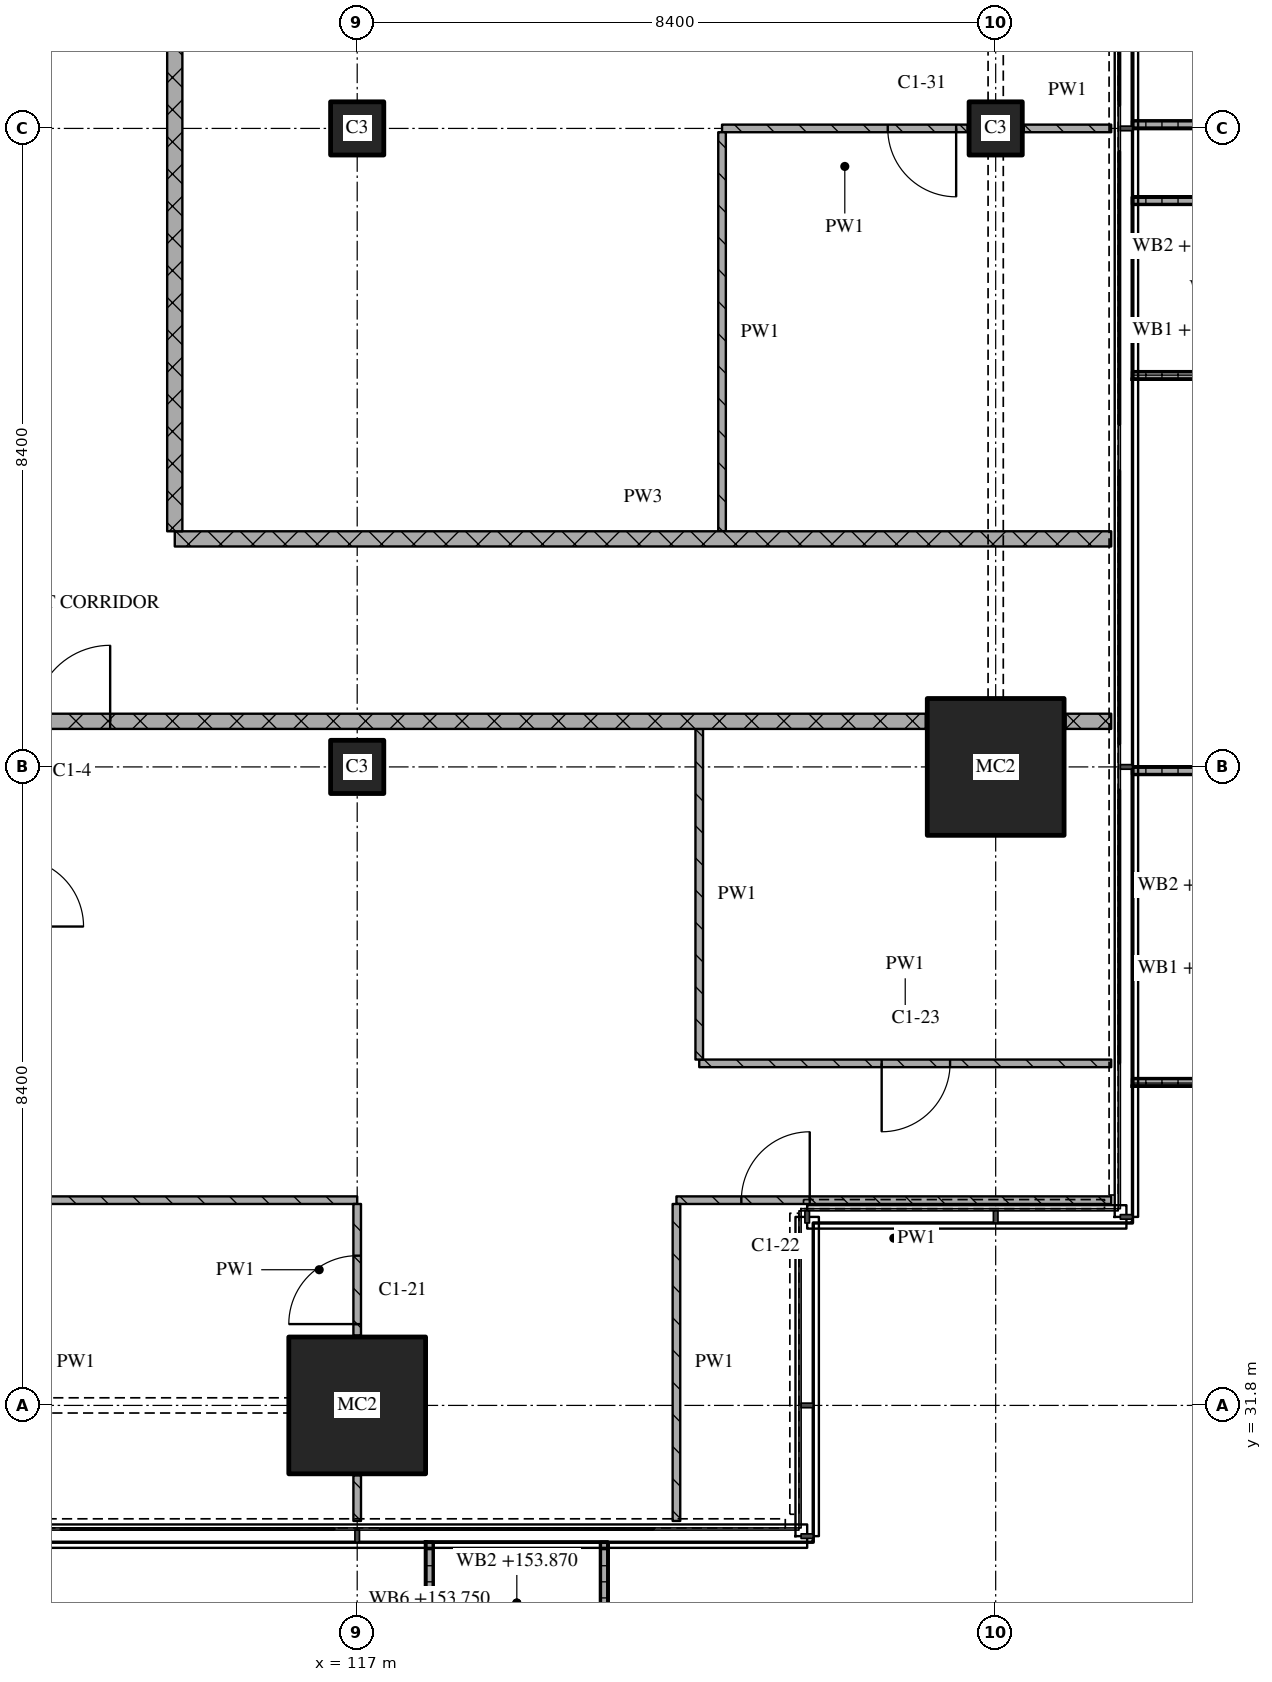
"""IFC4 building model, lengths in metres.
Left out: names, types, materials, properties, quantities, classifications, styles, units other than length and angle.
Written with IfcOpenShell. Run it as: python <this file> out.ifc"""

import sys

from ifc_helpers import new_model, si_unit, direction, frame, frame_2d, origin, origin_2d, place, context, subcontext, project, spatial, polyline, rectangle, outline, extrude, element, fill, save


model = new_model("IFC4")
c1 = context("Model", 3, precision=1e-05, world=origin(), true_north=direction((0.0, 1.0)))
c2 = subcontext(c1, "Body", "Model", "MODEL_VIEW")
j1 = project(units=[si_unit("LENGTHUNIT", "METRE"), si_unit("PLANEANGLEUNIT", "RADIAN")], contexts=[c1])
p1 = place(None, origin())
s1 = spatial("IfcSite", under=j1, at=p1, CompositionType="ELEMENT")
p2 = place(p1, origin())
s2 = spatial("IfcBuilding", under=s1, at=p2, CompositionType="ELEMENT")
p3 = place(p2, frame((0.0, 0.0, 151.05)))
s3 = spatial("IfcBuildingStorey", under=s2, at=p3, CompositionType="ELEMENT", Elevation=151.05)
p4 = place(p3, frame((117.0, 31.8, 0.0), z_axis=(0.0, 0.0, 1.0), x_axis=(1.0, 0.0, 0.0)))
e1 = element("IfcColumn", 1, at=p4, inside=s3, PredefinedType="COLUMN", context=c2, shape_type="SweptSolid", body=[
    extrude(rectangle(XDim=1.8, YDim=1.8, at=origin_2d()), origin(), (0.0, 0.0, 1.0), 3.6),
])
for number, where, z_axis, x_axis in (
    (2, (117.0, 40.2, 0.0), (0.0, 0.0, 1.0), (1.0, 0.0, 0.0)),
    (3, (117.0, 48.6, 0.0), (0.0, 0.0, 1.0), (1.0, 0.0, 0.0)),
):
    element("IfcColumn", number, at=place(p3, frame(where, z_axis=z_axis, x_axis=x_axis)), inside=s3, PredefinedType="COLUMN", context=c2, shape_type="SweptSolid", body=[
        extrude(rectangle(XDim=0.7, YDim=0.7, at=origin_2d()), origin(), (0.0, 0.0, 1.0), 3.6),
    ])
p5 = place(p3, frame((125.4, 40.2, 0.0), z_axis=(0.0, 0.0, 1.0), x_axis=(1.0, 0.0, 0.0)))
e4 = element("IfcColumn", 4, at=p5, inside=s3, PredefinedType="COLUMN", context=c2, shape_type="SweptSolid", body=[
    extrude(rectangle(XDim=1.8, YDim=1.8, at=origin_2d()), origin(), (0.0, 0.0, 1.0), 3.6),
])
p6 = place(p3, frame((125.4, 48.6, 0.0), z_axis=(0.0, 0.0, 1.0), x_axis=(1.0, 0.0, 0.0)))
e5 = element("IfcColumn", 5, at=p6, inside=s3, PredefinedType="COLUMN", context=c2, shape_type="SweptSolid", body=[
    extrude(rectangle(XDim=0.7, YDim=0.7, at=origin_2d()), origin(), (0.0, 0.0, 1.0), 3.6),
])
p7 = place(p3, origin())
e6 = element("IfcWall", 6, at=p7, inside=s3, PredefinedType="SOLIDWALL", context=c2, shape_type="SweptSolid", body=[
    extrude(outline(polyline([(117.9, 30.0), (118.0, 30.0), (118.0, 28.5), (120.2, 28.5), (120.2, 30.0), (120.3, 30.0), (120.3, 28.4), (117.9, 28.4), (117.9, 30.0)])), origin(), (0.0, 0.0, 1.0), 1.0),
])
p8 = place(p3, origin())
e7 = element("IfcWall", 7, at=p8, inside=s3, PredefinedType="SOLIDWALL", context=c2, shape_type="SweptSolid", body=[
    extrude(outline(polyline([(127.2, 36.0), (127.2, 36.1), (128.833, 36.1), (128.833, 40.1), (127.2, 40.1), (127.2, 40.2), (128.933, 40.2), (128.933, 36.0), (127.2, 36.0)])), origin(), (0.0, 0.0, 1.0), 1.0),
])
p9 = place(p3, origin())
e8 = element("IfcWall", 8, at=p9, inside=s3, PredefinedType="SOLIDWALL", context=c2, shape_type="SweptSolid", body=[
    extrude(outline(polyline([(127.2, 45.3), (127.2, 45.4), (128.7, 45.4), (128.7, 47.6), (127.2, 47.6), (127.2, 47.7), (128.8, 47.7), (128.8, 45.3), (127.2, 45.3)])), origin(), (0.0, 0.0, 1.0), 1.0),
])
p10 = place(p3, origin())
e9 = element("IfcWall", 9, at=p10, inside=s3, PredefinedType="SOLIDWALL", context=c2, shape_type="SweptSolid", body=[
    extrude(outline(polyline([(127.2, 48.6), (127.2, 48.7), (128.833, 48.7), (128.833, 52.7), (127.2, 52.7), (127.2, 52.8), (128.933, 52.8), (128.933, 48.6), (127.2, 48.6)])), origin(), (0.0, 0.0, 1.0), 1.0),
])
p11 = place(p3, frame((117.0, 34.5, 0.0), z_axis=(0.0, 0.0, 1.0), x_axis=(-1.0, 0.0, 0.0)))
e10 = element("IfcWall", 10, at=p11, inside=s3, PredefinedType="PARTITIONING", context=c2, shape_type="SweptSolid", body=[
    extrude(rectangle(XDim=16.7, YDim=0.1, at=frame_2d((8.35, 0.0))), origin(), (0.0, 0.0, 1.0), 3.32),
])
p12 = place(p11, frame((7.95, 0.0, 0.0)))
e11 = element("IfcOpeningElement", 11, at=p12, cuts=e10, PredefinedType="OPENING", context=c2, shape_type="SweptSolid", body=[
    extrude(rectangle(XDim=0.9, YDim=2.1, at=frame_2d((0.45, 1.05))), frame((0.0, 0.06, 0.0), z_axis=(0.0, -1.0, 0.0), x_axis=(1.0, 0.0, 0.0)), (0.0, 0.0, 1.0), 0.12),
])
p13 = place(p11, frame((14.25, 0.0, 0.0)))
e12 = element("IfcOpeningElement", 12, at=p13, cuts=e10, PredefinedType="OPENING", context=c2, shape_type="SweptSolid", body=[
    extrude(rectangle(XDim=0.9, YDim=2.1, at=frame_2d((0.45, 1.05))), frame((0.0, 0.06, 0.0), z_axis=(0.0, -1.0, 0.0), x_axis=(1.0, 0.0, 0.0)), (0.0, 0.0, 1.0), 0.12),
])
p14 = place(p3, frame((126.92, 34.5, 0.0), z_axis=(0.0, 0.0, 1.0), x_axis=(-1.0, 0.0, 0.0)))
e13 = element("IfcWall", 13, at=p14, inside=s3, PredefinedType="PARTITIONING", context=c2, shape_type="SweptSolid", body=[
    extrude(rectangle(XDim=5.72, YDim=0.1, at=frame_2d((2.86, 0.0))), origin(), (0.0, 0.0, 1.0), 3.32),
])
p15 = place(p14, frame((3.966, 0.0, 0.0)))
e14 = element("IfcOpeningElement", 14, at=p15, cuts=e13, PredefinedType="OPENING", context=c2, shape_type="SweptSolid", body=[
    extrude(rectangle(XDim=0.9, YDim=2.1, at=frame_2d((0.45, 1.05))), frame((0.0, 0.06, 0.0), z_axis=(0.0, -1.0, 0.0), x_axis=(1.0, 0.0, 0.0)), (0.0, 0.0, 1.0), 0.12),
])
p16 = place(p3, frame((121.5, 36.3, 0.0), z_axis=(0.0, 0.0, 1.0), x_axis=(1.0, 0.0, 0.0)))
e15 = element("IfcWall", 15, at=p16, inside=s3, PredefinedType="PARTITIONING", context=c2, shape_type="SweptSolid", body=[
    extrude(rectangle(XDim=5.42, YDim=0.1, at=frame_2d((2.71, 0.0))), origin(), (0.0, 0.0, 1.0), 3.32),
])
p17 = place(p16, frame((2.4, 0.0, 0.0)))
e16 = element("IfcOpeningElement", 16, at=p17, cuts=e15, PredefinedType="OPENING", context=c2, shape_type="SweptSolid", body=[
    extrude(rectangle(XDim=0.9, YDim=2.1, at=frame_2d((0.45, 1.05))), frame((0.0, 0.06, 0.0), z_axis=(0.0, -1.0, 0.0), x_axis=(1.0, 0.0, 0.0)), (0.0, 0.0, 1.0), 0.12),
])
p18 = place(p3, frame((124.48, 40.8, 0.0), z_axis=(0.0, 0.0, 1.0), x_axis=(-1.0, 0.0, 0.0)))
e17 = element("IfcWall", 17, at=p18, inside=s3, PredefinedType="PARTITIONING", context=c2, shape_type="SweptSolid", body=[
    extrude(rectangle(XDim=24.28, YDim=0.2, at=frame_2d((12.14, 0.0))), origin(), (0.0, 0.0, 1.0), 3.32),
])
p19 = place(p18, frame((10.73, 0.0, 0.0)))
e18 = element("IfcOpeningElement", 18, at=p19, cuts=e17, PredefinedType="OPENING", context=c2, shape_type="SweptSolid", body=[
    extrude(rectangle(XDim=1.0, YDim=2.1, at=frame_2d((0.5, 1.05))), frame((0.0, 0.11, 0.0), z_axis=(0.0, -1.0, 0.0), x_axis=(1.0, 0.0, 0.0)), (0.0, 0.0, 1.0), 0.22),
])
p20 = place(p3, frame((126.32, 40.8, 0.0), z_axis=(0.0, 0.0, 1.0), x_axis=(1.0, 0.0, 0.0)))
e19 = element("IfcWall", 19, at=p20, inside=s3, PredefinedType="PARTITIONING", context=c2, shape_type="SweptSolid", body=[
    extrude(rectangle(XDim=0.6, YDim=0.2, at=frame_2d((0.3, 0.0))), origin(), (0.0, 0.0, 1.0), 3.32),
])
p21 = place(p3, frame((114.6, 43.2, 0.0), z_axis=(0.0, 0.0, 1.0), x_axis=(1.0, 0.0, 0.0)))
e20 = element("IfcWall", 20, at=p21, inside=s3, PredefinedType="PARTITIONING", context=c2, shape_type="SweptSolid", body=[
    extrude(rectangle(XDim=12.32, YDim=0.2, at=frame_2d((6.16, 0.0))), origin(), (0.0, 0.0, 1.0), 3.32),
])
p22 = place(p3, frame((125.03, 48.6, 0.0), z_axis=(0.0, 0.0, 1.0), x_axis=(-1.0, 0.0, 0.0)))
e21 = element("IfcWall", 21, at=p22, inside=s3, PredefinedType="PARTITIONING", context=c2, shape_type="SweptSolid", body=[
    extrude(rectangle(XDim=3.23, YDim=0.1, at=frame_2d((1.615, 0.0))), origin(), (0.0, 0.0, 1.0), 3.32),
])
p23 = place(p22, frame((0.15, 0.0, 0.0)))
e22 = element("IfcOpeningElement", 22, at=p23, cuts=e21, PredefinedType="OPENING", context=c2, shape_type="SweptSolid", body=[
    extrude(rectangle(XDim=0.9, YDim=2.1, at=frame_2d((0.45, 1.05))), frame((0.0, 0.06, 0.0), z_axis=(0.0, -1.0, 0.0), x_axis=(1.0, 0.0, 0.0)), (0.0, 0.0, 1.0), 0.12),
])
p24 = place(p3, frame((125.77, 48.6, 0.0), z_axis=(0.0, 0.0, 1.0), x_axis=(1.0, 0.0, 0.0)))
e23 = element("IfcWall", 23, at=p24, inside=s3, PredefinedType="PARTITIONING", context=c2, shape_type="SweptSolid", body=[
    extrude(rectangle(XDim=1.15, YDim=0.1, at=frame_2d((0.575, 0.0))), origin(), (0.0, 0.0, 1.0), 3.32),
])
p25 = place(p3, frame((114.6, 61.1, 0.0), z_axis=(0.0, 0.0, 1.0), x_axis=(0.0, -1.0, 0.0)))
e24 = element("IfcWall", 24, at=p25, inside=s3, PredefinedType="PARTITIONING", context=c2, shape_type="SweptSolid", body=[
    extrude(rectangle(XDim=17.8, YDim=0.2, at=frame_2d((8.9, 0.0))), origin(), (0.0, 0.0, 1.0), 3.32),
])
p26 = place(p25, frame((4.65, 0.0, 0.0)))
e25 = element("IfcOpeningElement", 25, at=p26, cuts=e24, PredefinedType="OPENING", context=c2, shape_type="SweptSolid", body=[
    extrude(rectangle(XDim=1.0, YDim=2.1, at=frame_2d((0.5, 1.05))), frame((0.0, 0.11, 0.0), z_axis=(0.0, -1.0, 0.0), x_axis=(1.0, 0.0, 0.0)), (0.0, 0.0, 1.0), 0.22),
])
p27 = place(p3, frame((117.0, 30.88, 0.0), z_axis=(0.0, 0.0, 1.0), x_axis=(0.0, -1.0, 0.0)))
e26 = element("IfcWall", 26, at=p27, inside=s3, PredefinedType="PARTITIONING", context=c2, shape_type="SweptSolid", body=[
    extrude(rectangle(XDim=0.6, YDim=0.1, at=frame_2d((0.3, 0.0))), origin(), (0.0, 0.0, 1.0), 3.32),
])
p28 = place(p3, frame((117.0, 32.72, 0.0), z_axis=(0.0, 0.0, 1.0), x_axis=(0.0, 1.0, 0.0)))
e27 = element("IfcWall", 27, at=p28, inside=s3, PredefinedType="PARTITIONING", context=c2, shape_type="SweptSolid", body=[
    extrude(rectangle(XDim=1.73, YDim=0.1, at=frame_2d((0.865, 0.0))), origin(), (0.0, 0.0, 1.0), 3.32),
])
p29 = place(p28, frame((0.15, 0.0, 0.0)))
e28 = element("IfcOpeningElement", 28, at=p29, cuts=e27, PredefinedType="OPENING", context=c2, shape_type="SweptSolid", body=[
    extrude(rectangle(XDim=0.9, YDim=2.1, at=frame_2d((0.45, 1.05))), frame((0.0, 0.06, 0.0), z_axis=(0.0, -1.0, 0.0), x_axis=(1.0, 0.0, 0.0)), (0.0, 0.0, 1.0), 0.12),
])
p30 = place(p3, frame((121.2, 34.45, 0.0), z_axis=(0.0, 0.0, 1.0), x_axis=(0.0, -1.0, 0.0)))
e29 = element("IfcWall", 29, at=p30, inside=s3, PredefinedType="PARTITIONING", context=c2, shape_type="SweptSolid", body=[
    extrude(rectangle(XDim=4.17, YDim=0.1, at=frame_2d((2.085, 0.0))), origin(), (0.0, 0.0, 1.0), 3.32),
])
p31 = place(p3, frame((121.5, 40.7, 0.0), z_axis=(0.0, 0.0, 1.0), x_axis=(0.0, -1.0, 0.0)))
e30 = element("IfcWall", 30, at=p31, inside=s3, PredefinedType="PARTITIONING", context=c2, shape_type="SweptSolid", body=[
    extrude(rectangle(XDim=4.35, YDim=0.1, at=frame_2d((2.175, 0.0))), origin(), (0.0, 0.0, 1.0), 3.32),
])
p32 = place(p3, frame((121.8, 48.55, 0.0), z_axis=(0.0, 0.0, 1.0), x_axis=(0.0, -1.0, 0.0)))
e31 = element("IfcWall", 31, at=p32, inside=s3, PredefinedType="PARTITIONING", context=c2, shape_type="SweptSolid", body=[
    extrude(rectangle(XDim=5.25, YDim=0.1, at=frame_2d((2.625, 0.0))), origin(), (0.0, 0.0, 1.0), 3.32),
])
p33 = place(p15, origin())
e32 = element("IfcDoor", 32, at=p33, inside=s3, OperationType="SINGLE_SWING_RIGHT", PredefinedType="DOOR", context=c2, shape_type="SweptSolid", body=[
    extrude(rectangle(XDim=0.9, YDim=2.1, at=frame_2d((0.45, 1.05))), frame((0.0, 0.025, 0.0), z_axis=(0.0, -1.0, 0.0), x_axis=(1.0, 0.0, 0.0)), (0.0, 0.0, 1.0), 0.05),
])
fill(e14, e32)
p34 = place(p17, origin())
e33 = element("IfcDoor", 33, at=p34, inside=s3, OperationType="SINGLE_SWING_RIGHT", PredefinedType="DOOR", context=c2, shape_type="SweptSolid", body=[
    extrude(rectangle(XDim=0.9, YDim=2.1, at=frame_2d((0.45, 1.05))), frame((0.0, 0.025, 0.0), z_axis=(0.0, -1.0, 0.0), x_axis=(1.0, 0.0, 0.0)), (0.0, 0.0, 1.0), 0.05),
])
fill(e16, e33)
p35 = place(p19, origin())
e34 = element("IfcDoor", 34, at=p35, inside=s3, OperationType="SINGLE_SWING_RIGHT", PredefinedType="DOOR", context=c2, shape_type="SweptSolid", body=[
    extrude(rectangle(XDim=1.0, YDim=2.1, at=frame_2d((0.5, 1.05))), frame((0.0, 0.025, 0.0), z_axis=(0.0, -1.0, 0.0), x_axis=(1.0, 0.0, 0.0)), (0.0, 0.0, 1.0), 0.05),
])
fill(e18, e34)
p36 = place(p23, origin())
e35 = element("IfcDoor", 35, at=p36, inside=s3, OperationType="SINGLE_SWING_LEFT", PredefinedType="DOOR", context=c2, shape_type="SweptSolid", body=[
    extrude(rectangle(XDim=0.9, YDim=2.1, at=frame_2d((0.45, 1.05))), frame((0.0, 0.025, 0.0), z_axis=(0.0, -1.0, 0.0), x_axis=(1.0, 0.0, 0.0)), (0.0, 0.0, 1.0), 0.05),
])
fill(e22, e35)
p37 = place(p29, origin())
e36 = element("IfcDoor", 36, at=p37, inside=s3, OperationType="SINGLE_SWING_LEFT", PredefinedType="DOOR", context=c2, shape_type="SweptSolid", body=[
    extrude(rectangle(XDim=0.9, YDim=2.1, at=frame_2d((0.45, 1.05))), frame((0.0, 0.025, 0.0), z_axis=(0.0, -1.0, 0.0), x_axis=(1.0, 0.0, 0.0)), (0.0, 0.0, 1.0), 0.05),
])
fill(e28, e36)
save(model, sys.argv[1])
